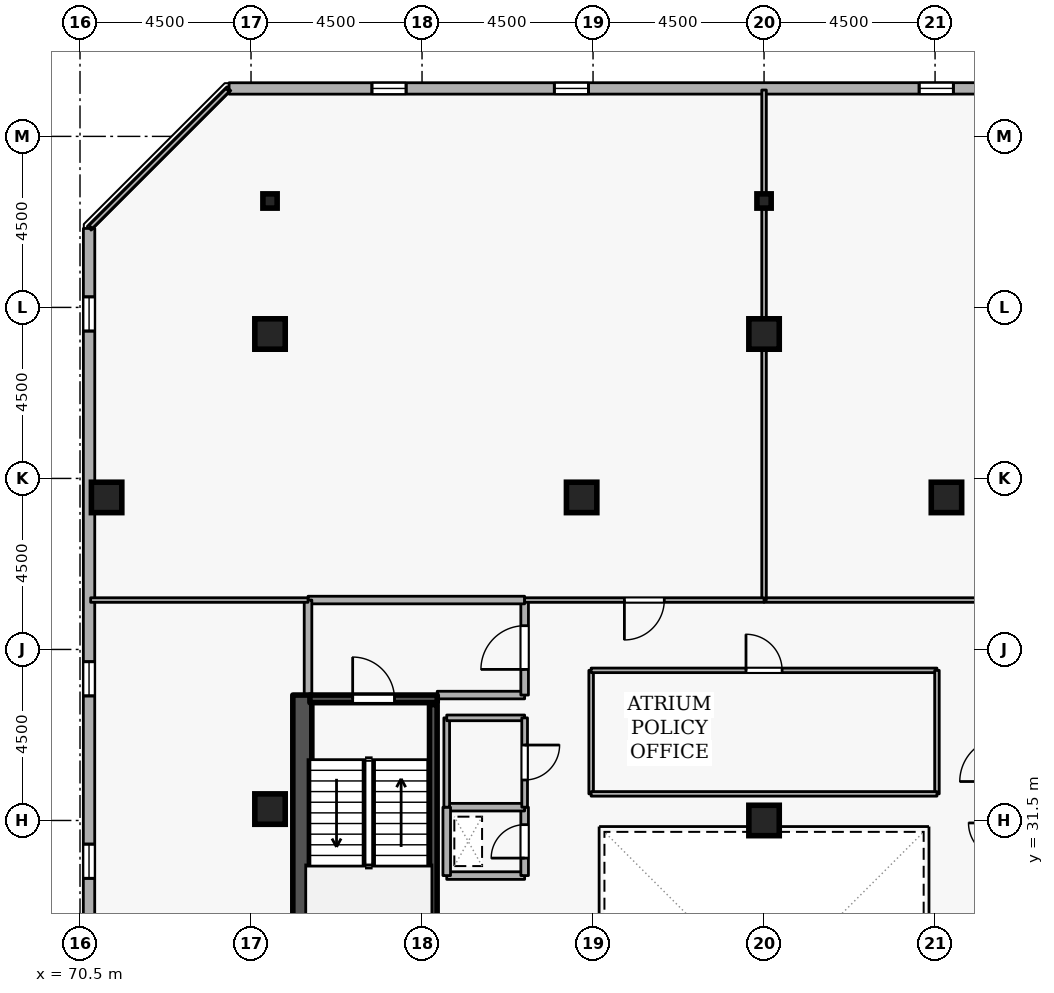
"""IFC4 building model, lengths in metres.
Left out: names, types, materials, properties, quantities, classifications, styles, units other than length and angle.
Written with IfcOpenShell. Run it as: python <this file> out.ifc"""

import sys

from ifc_helpers import new_model, si_unit, direction, frame, frame_2d, origin, origin_2d, place, context, subcontext, project, spatial, rectangle, i_section, extrude, element, fill, save


model = new_model("IFC4")
c1 = context("Model", 3, precision=1e-05, world=origin(), true_north=direction((0.0, 1.0)))
c2 = subcontext(c1, "Body", "Model", "MODEL_VIEW")
j1 = project(units=[si_unit("LENGTHUNIT", "METRE"), si_unit("PLANEANGLEUNIT", "RADIAN")], contexts=[c1])
p1 = place(None, origin())
s1 = spatial("IfcSite", under=j1, at=p1, CompositionType="ELEMENT")
p2 = place(p1, origin())
s2 = spatial("IfcBuilding", under=s1, at=p2, CompositionType="ELEMENT")
p3 = place(p2, frame((0.0, 0.0, 261.9)))
s3 = spatial("IfcBuildingStorey", under=s2, at=p3, CompositionType="ELEMENT", Elevation=261.9)
p4 = place(p3, frame((76.35, 19.2, 0.0), z_axis=(0.0, 0.0, 1.0), x_axis=(0.0, 1.0, 0.0)))
e1 = element("IfcWall", 1, at=p4, inside=s3, PredefinedType="SHEAR", context=c2, shape_type="SweptSolid", body=[
    extrude(rectangle(XDim=15.6, YDim=0.5, at=frame_2d((7.8, 0.0))), origin(), (0.0, 0.0, 1.0), 3.6),
])
for number, where, z_axis, x_axis in (
    (2, (88.5, 44.3, 0.0), (0.0, 0.0, 1.0), (1.0, 0.0, 0.0)),
    (3, (75.5, 44.3, 0.0), (0.0, 0.0, 1.0), (1.0, 0.0, 0.0)),
    (4, (71.2, 40.0, 0.0), (0.0, 0.0, 1.0), (1.0, 0.0, 0.0)),
    (5, (93.3, 40.0, 0.0), (0.0, 0.0, 1.0), (1.0, 0.0, 0.0)),
    (6, (83.7, 40.0, 0.0), (0.0, 0.0, 1.0), (1.0, 0.0, 0.0)),
    (7, (75.5, 31.8, 0.0), (0.0, 0.0, 1.0), (1.0, 0.0, 0.0)),
    (8, (88.5, 31.5, 0.0), (0.0, 0.0, 1.0), (1.0, 0.0, 0.0)),
):
    element("IfcColumn", number, at=place(p3, frame(where, z_axis=z_axis, x_axis=x_axis)), inside=s3, PredefinedType="COLUMN", context=c2, shape_type="SweptSolid", body=[
        extrude(rectangle(XDim=0.8, YDim=0.8, at=origin_2d()), origin(), (0.0, 0.0, 1.0), 3.6),
    ])
for number, where, z_axis, x_axis in (
    (9, (88.5, 47.8, 0.0), (0.0, 0.0, 1.0), (1.0, 0.0, 0.0)),
    (10, (75.5, 47.8, 0.0), (0.0, 0.0, 1.0), (1.0, 0.0, 0.0)),
):
    element("IfcColumn", number, at=place(p3, frame(where, z_axis=z_axis, x_axis=x_axis)), inside=s3, PredefinedType="COLUMN", context=c2, shape_type="SweptSolid", body=[
        extrude(i_section(OverallWidth=0.375, OverallDepth=0.375, WebThickness=0.017, FlangeThickness=0.027, FilletRadius=0.015, at=origin_2d()), origin(), (0.0, 0.0, 1.0), 3.6),
    ])
p5 = place(p3, frame((109.681, 50.765, 0.0), z_axis=(0.0, 0.0, 1.0), x_axis=(-0.999999994606, -0.000103863011, 0.0)))
e11 = element("IfcWall", 11, at=p5, inside=s3, PredefinedType="STANDARD", context=c2, shape_type="SweptSolid", body=[
    extrude(rectangle(XDim=35.259, YDim=0.3, at=frame_2d((17.629, 0.0))), origin(), (0.0, 0.0, 1.0), 2.7),
])
p6 = place(p5, frame((1.8, 0.0, 0.72)))
e12 = element("IfcOpeningElement", 12, at=p6, cuts=e11, PredefinedType="OPENING", context=c2, shape_type="SweptSolid", body=[
    extrude(rectangle(XDim=0.9, YDim=1.75, at=frame_2d((0.45, 0.875))), frame((0.0, 0.16, 0.0), z_axis=(0.0, -1.0, 0.0), x_axis=(1.0, 0.0, 0.0)), (0.0, 0.0, 1.0), 0.32),
])
p7 = place(p5, frame((6.6, 0.0, 0.72)))
e13 = element("IfcOpeningElement", 13, at=p7, cuts=e11, PredefinedType="OPENING", context=c2, shape_type="SweptSolid", body=[
    extrude(rectangle(XDim=0.9, YDim=1.75, at=frame_2d((0.45, 0.875))), frame((0.0, 0.16, 0.0), z_axis=(0.0, -1.0, 0.0), x_axis=(1.0, 0.0, 0.0)), (0.0, 0.0, 1.0), 0.32),
])
p8 = place(p5, frame((11.4, 0.0, 0.72)))
e14 = element("IfcOpeningElement", 14, at=p8, cuts=e11, PredefinedType="OPENING", context=c2, shape_type="SweptSolid", body=[
    extrude(rectangle(XDim=0.9, YDim=1.75, at=frame_2d((0.45, 0.875))), frame((0.0, 0.16, 0.0), z_axis=(0.0, -1.0, 0.0), x_axis=(1.0, 0.0, 0.0)), (0.0, 0.0, 1.0), 0.32),
])
p9 = place(p5, frame((16.2, 0.0, 0.72)))
e15 = element("IfcOpeningElement", 15, at=p9, cuts=e11, PredefinedType="OPENING", context=c2, shape_type="SweptSolid", body=[
    extrude(rectangle(XDim=0.9, YDim=1.75, at=frame_2d((0.45, 0.875))), frame((0.0, 0.16, 0.0), z_axis=(0.0, -1.0, 0.0), x_axis=(1.0, 0.0, 0.0)), (0.0, 0.0, 1.0), 0.32),
])
p10 = place(p5, frame((25.8, 0.0, 0.72)))
e16 = element("IfcOpeningElement", 16, at=p10, cuts=e11, PredefinedType="OPENING", context=c2, shape_type="SweptSolid", body=[
    extrude(rectangle(XDim=0.9, YDim=1.75, at=frame_2d((0.45, 0.875))), frame((0.0, 0.16, 0.0), z_axis=(0.0, -1.0, 0.0), x_axis=(1.0, 0.0, 0.0)), (0.0, 0.0, 1.0), 0.32),
])
p11 = place(p5, frame((30.6, 0.0, 0.72)))
e17 = element("IfcOpeningElement", 17, at=p11, cuts=e11, PredefinedType="OPENING", context=c2, shape_type="SweptSolid", body=[
    extrude(rectangle(XDim=0.9, YDim=1.75, at=frame_2d((0.45, 0.875))), frame((0.0, 0.16, 0.0), z_axis=(0.0, -1.0, 0.0), x_axis=(1.0, 0.0, 0.0)), (0.0, 0.0, 1.0), 0.32),
])
p12 = place(p3, frame((70.739, 47.078, 0.0), z_axis=(0.0, 0.0, 1.0), x_axis=(-0.000103863011, -0.999999994606, 0.0)))
e18 = element("IfcWall", 18, at=p12, inside=s3, PredefinedType="STANDARD", context=c2, shape_type="SweptSolid", body=[
    extrude(rectangle(XDim=35.259, YDim=0.3, at=frame_2d((17.629, 0.0))), origin(), (0.0, 0.0, 1.0), 2.7),
])
p13 = place(p12, frame((1.8, 0.0, 0.72)))
e19 = element("IfcOpeningElement", 19, at=p13, cuts=e18, PredefinedType="OPENING", context=c2, shape_type="SweptSolid", body=[
    extrude(rectangle(XDim=0.9, YDim=1.75, at=frame_2d((0.45, 0.875))), frame((0.0, 0.16, 0.0), z_axis=(0.0, -1.0, 0.0), x_axis=(1.0, 0.0, 0.0)), (0.0, 0.0, 1.0), 0.32),
])
p14 = place(p12, frame((11.4, 0.0, 0.72)))
e20 = element("IfcOpeningElement", 20, at=p14, cuts=e18, PredefinedType="OPENING", context=c2, shape_type="SweptSolid", body=[
    extrude(rectangle(XDim=0.9, YDim=1.75, at=frame_2d((0.45, 0.875))), frame((0.0, 0.16, 0.0), z_axis=(0.0, -1.0, 0.0), x_axis=(1.0, 0.0, 0.0)), (0.0, 0.0, 1.0), 0.32),
])
p15 = place(p12, frame((16.2, 0.0, 0.72)))
e21 = element("IfcOpeningElement", 21, at=p15, cuts=e18, PredefinedType="OPENING", context=c2, shape_type="SweptSolid", body=[
    extrude(rectangle(XDim=0.9, YDim=1.75, at=frame_2d((0.45, 0.875))), frame((0.0, 0.16, 0.0), z_axis=(0.0, -1.0, 0.0), x_axis=(1.0, 0.0, 0.0)), (0.0, 0.0, 1.0), 0.32),
])
p16 = place(p12, frame((25.8, 0.0, 0.72)))
e22 = element("IfcOpeningElement", 22, at=p16, cuts=e18, PredefinedType="OPENING", context=c2, shape_type="SweptSolid", body=[
    extrude(rectangle(XDim=0.9, YDim=1.75, at=frame_2d((0.45, 0.875))), frame((0.0, 0.16, 0.0), z_axis=(0.0, -1.0, 0.0), x_axis=(1.0, 0.0, 0.0)), (0.0, 0.0, 1.0), 0.32),
])
p17 = place(p12, frame((30.6, 0.0, 0.72)))
e23 = element("IfcOpeningElement", 23, at=p17, cuts=e18, PredefinedType="OPENING", context=c2, shape_type="SweptSolid", body=[
    extrude(rectangle(XDim=0.9, YDim=1.75, at=frame_2d((0.45, 0.875))), frame((0.0, 0.16, 0.0), z_axis=(0.0, -1.0, 0.0), x_axis=(1.0, 0.0, 0.0)), (0.0, 0.0, 1.0), 0.32),
])
p18 = place(p3, frame((76.55, 34.7, 0.0), z_axis=(0.0, 0.0, 1.0), x_axis=(1.0, 0.0, 0.0)))
e24 = element("IfcWall", 24, at=p18, inside=s3, PredefinedType="SHEAR", context=c2, shape_type="SweptSolid", body=[
    extrude(rectangle(XDim=3.35, YDim=0.2, at=frame_2d((1.675, 0.0))), origin(), (0.0, 0.0, 1.0), 3.6),
])
p19 = place(p18, frame((1.125, 0.0, 0.0)))
e25 = element("IfcOpeningElement", 25, at=p19, cuts=e24, PredefinedType="OPENING", context=c2, shape_type="SweptSolid", body=[
    extrude(rectangle(XDim=1.1, YDim=2.1, at=frame_2d((0.55, 1.05))), frame((0.0, 0.11, 0.0), z_axis=(0.0, -1.0, 0.0), x_axis=(1.0, 0.0, 0.0)), (0.0, 0.0, 1.0), 0.22),
])
p20 = place(p3, frame((79.797, 27.45, 0.0), z_axis=(0.0, 0.0, 1.0), x_axis=(0.0, 1.0, 0.0)))
e26 = element("IfcWall", 26, at=p20, inside=s3, PredefinedType="SHEAR", context=c2, shape_type="SweptSolid", body=[
    extrude(rectangle(XDim=7.1, YDim=0.2, at=frame_2d((3.55, 0.0))), origin(), (0.0, 0.0, 1.0), 3.6),
])
p21 = place(p3, frame((79.9, 34.8, 0.0), z_axis=(0.0, 0.0, 1.0), x_axis=(1.0, 0.0, 0.0)))
e27 = element("IfcWall", 27, at=p21, inside=s3, PredefinedType="STANDARD", context=c2, shape_type="SweptSolid", body=[
    extrude(rectangle(XDim=2.3, YDim=0.2, at=frame_2d((1.15, 0.0))), origin(), (0.0, 0.0, 1.0), 2.545),
])
p22 = place(p3, frame((82.2, 34.8, 0.0), z_axis=(0.0, 0.0, 1.0), x_axis=(0.0, 1.0, 0.0)))
e28 = element("IfcWall", 28, at=p22, inside=s3, PredefinedType="STANDARD", context=c2, shape_type="SweptSolid", body=[
    extrude(rectangle(XDim=2.5, YDim=0.2, at=frame_2d((1.25, 0.0))), origin(), (0.0, 0.0, 1.0), 3.34),
])
p23 = place(p22, frame((0.675, 0.0, 0.0)))
e29 = element("IfcOpeningElement", 29, at=p23, cuts=e28, PredefinedType="OPENING", context=c2, shape_type="SweptSolid", body=[
    extrude(rectangle(XDim=1.15, YDim=2.1, at=frame_2d((0.575, 1.05))), frame((0.0, 0.11, 0.0), z_axis=(0.0, -1.0, 0.0), x_axis=(1.0, 0.0, 0.0)), (0.0, 0.0, 1.0), 0.22),
])
p24 = place(p3, frame((82.2, 37.3, 0.0), z_axis=(0.0, 0.0, 1.0), x_axis=(-1.0, 0.0, 0.0)))
e30 = element("IfcWall", 30, at=p24, inside=s3, PredefinedType="STANDARD", context=c2, shape_type="SweptSolid", body=[
    extrude(rectangle(XDim=5.7, YDim=0.2, at=frame_2d((2.85, 0.0))), origin(), (0.0, 0.0, 1.0), 3.34),
])
p25 = place(p3, frame((76.5, 37.3, 0.0), z_axis=(0.0, 0.0, 1.0), x_axis=(0.0, -1.0, 0.0)))
e31 = element("IfcWall", 31, at=p25, inside=s3, PredefinedType="STANDARD", context=c2, shape_type="SweptSolid", body=[
    extrude(rectangle(XDim=2.5, YDim=0.2, at=frame_2d((1.25, 0.0))), origin(), (0.0, 0.0, 1.0), 3.34),
])
p26 = place(p3, frame((80.15, 30.05, 0.0), z_axis=(0.0, 0.0, 1.0), x_axis=(1.0, 0.0, 0.0)))
e32 = element("IfcWall", 32, at=p26, inside=s3, PredefinedType="STANDARD", context=c2, shape_type="SweptSolid", body=[
    extrude(rectangle(XDim=2.05, YDim=0.2, at=frame_2d((1.025, 0.0))), origin(), (0.0, 0.0, 1.0), 3.34),
])
p27 = place(p3, frame((82.2, 30.05, 0.0), z_axis=(0.0, 0.0, 1.0), x_axis=(0.0, 1.0, 0.0)))
e33 = element("IfcWall", 33, at=p27, inside=s3, PredefinedType="STANDARD", context=c2, shape_type="SweptSolid", body=[
    extrude(rectangle(XDim=1.8, YDim=0.2, at=frame_2d((0.9, 0.0))), origin(), (0.0, 0.0, 1.0), 3.34),
])
p28 = place(p27, frame((0.46, 0.0, 0.0)))
e34 = element("IfcOpeningElement", 34, at=p28, cuts=e33, PredefinedType="OPENING", context=c2, shape_type="SweptSolid", body=[
    extrude(rectangle(XDim=0.88, YDim=2.04, at=frame_2d((0.44, 1.02))), frame((0.0, 0.11, 0.0), z_axis=(0.0, -1.0, 0.0), x_axis=(1.0, 0.0, 0.0)), (0.0, 0.0, 1.0), 0.22),
])
p29 = place(p3, frame((82.2, 31.85, 0.0), z_axis=(0.0, 0.0, 1.0), x_axis=(-1.0, 0.0, 0.0)))
e35 = element("IfcWall", 35, at=p29, inside=s3, PredefinedType="STANDARD", context=c2, shape_type="SweptSolid", body=[
    extrude(rectangle(XDim=2.05, YDim=0.2, at=frame_2d((1.025, 0.0))), origin(), (0.0, 0.0, 1.0), 3.34),
])
p30 = place(p3, frame((80.15, 31.85, 0.0), z_axis=(0.0, 0.0, 1.0), x_axis=(0.0, -1.0, 0.0)))
e36 = element("IfcWall", 36, at=p30, inside=s3, PredefinedType="STANDARD", context=c2, shape_type="SweptSolid", body=[
    extrude(rectangle(XDim=1.8, YDim=0.2, at=frame_2d((0.9, 0.0))), origin(), (0.0, 0.0, 1.0), 3.34),
])
p31 = place(p3, frame((80.15, 31.85, 0.0), z_axis=(0.0, 0.0, 1.0), x_axis=(0.0, 1.0, 0.0)))
e37 = element("IfcWall", 37, at=p31, inside=s3, PredefinedType="PARTITIONING", context=c2, shape_type="SweptSolid", body=[
    extrude(rectangle(XDim=2.35, YDim=0.15, at=frame_2d((1.175, 0.0))), origin(), (0.0, 0.0, 1.0), 3.34),
])
p32 = place(p3, frame((80.15, 34.2, 0.0), z_axis=(0.0, 0.0, 1.0), x_axis=(1.0, 0.0, 0.0)))
e38 = element("IfcWall", 38, at=p32, inside=s3, PredefinedType="PARTITIONING", context=c2, shape_type="SweptSolid", body=[
    extrude(rectangle(XDim=2.05, YDim=0.15, at=frame_2d((1.025, 0.0))), origin(), (0.0, 0.0, 1.0), 2.545),
])
p33 = place(p3, frame((82.2, 34.2, 0.0), z_axis=(0.0, 0.0, 1.0), x_axis=(0.0, -1.0, 0.0)))
e39 = element("IfcWall", 39, at=p33, inside=s3, PredefinedType="PARTITIONING", context=c2, shape_type="SweptSolid", body=[
    extrude(rectangle(XDim=2.35, YDim=0.15, at=frame_2d((1.175, 0.0))), origin(), (0.0, 0.0, 1.0), 3.34),
])
p34 = place(p33, frame((0.715, 0.0, 0.0)))
e40 = element("IfcOpeningElement", 40, at=p34, cuts=e39, PredefinedType="OPENING", context=c2, shape_type="SweptSolid", body=[
    extrude(rectangle(XDim=0.92, YDim=2.08, at=frame_2d((0.46, 1.04))), frame((0.0, 0.085, 0.0), z_axis=(0.0, -1.0, 0.0), x_axis=(1.0, 0.0, 0.0)), (0.0, 0.0, 1.0), 0.17),
])
p35 = place(p3, frame((100.7, 37.3, 0.0), z_axis=(0.0, 0.0, 1.0), x_axis=(-1.0, 0.0, 0.0)))
e41 = element("IfcWall", 41, at=p35, inside=s3, PredefinedType="PARTITIONING", context=c2, shape_type="SweptSolid", body=[
    extrude(rectangle(XDim=12.2, YDim=0.12, at=frame_2d((6.1, 0.0))), origin(), (0.0, 0.0, 1.0), 3.34),
])
p36 = place(p35, frame((5.575, 0.0, 0.0)))
e42 = element("IfcOpeningElement", 42, at=p36, cuts=e41, PredefinedType="OPENING", context=c2, shape_type="SweptSolid", body=[
    extrude(rectangle(XDim=1.05, YDim=2.1, at=frame_2d((0.525, 1.05))), frame((0.0, 0.07, 0.0), z_axis=(0.0, -1.0, 0.0), x_axis=(1.0, 0.0, 0.0)), (0.0, 0.0, 1.0), 0.14),
])
p37 = place(p3, frame((88.5, 37.3, 0.0), z_axis=(0.0, 0.0, 1.0), x_axis=(0.0, 1.0, 0.0)))
e43 = element("IfcWall", 43, at=p37, inside=s3, PredefinedType="PARTITIONING", context=c2, shape_type="SweptSolid", body=[
    extrude(rectangle(XDim=13.42, YDim=0.12, at=frame_2d((6.71, 0.0))), origin(), (0.0, 0.0, 1.0), 2.932),
])
p38 = place(p3, frame((76.5, 37.3, 0.0), z_axis=(0.0, 0.0, 1.0), x_axis=(-1.0, 0.0, 0.0)))
e44 = element("IfcWall", 44, at=p38, inside=s3, PredefinedType="PARTITIONING", context=c2, shape_type="SweptSolid", body=[
    extrude(rectangle(XDim=5.72, YDim=0.12, at=frame_2d((2.86, 0.0))), origin(), (0.0, 0.0, 1.0), 3.34),
])
p39 = place(p3, frame((70.78, 47.117, 0.0), z_axis=(0.0, 0.0, 1.0), x_axis=(0.707106781187, 0.707106781187, 0.0)))
e45 = element("IfcWall", 45, at=p39, inside=s3, PredefinedType="PARTITIONING", context=c2, shape_type="SweptSolid", body=[
    extrude(rectangle(XDim=5.095, YDim=0.12, at=frame_2d((2.547, 0.0))), origin(), (0.0, 0.0, 1.0), 3.34),
])
p40 = place(p3, frame((88.5, 37.3, 0.0), z_axis=(0.0, 0.0, 1.0), x_axis=(-1.0, 0.0, 0.0)))
e46 = element("IfcWall", 46, at=p40, inside=s3, PredefinedType="PARTITIONING", context=c2, shape_type="SweptSolid", body=[
    extrude(rectangle(XDim=6.3, YDim=0.12, at=frame_2d((3.15, 0.0))), origin(), (0.0, 0.0, 1.0), 3.34),
])
p41 = place(p40, frame((2.625, 0.0, 0.0)))
e47 = element("IfcOpeningElement", 47, at=p41, cuts=e46, PredefinedType="OPENING", context=c2, shape_type="SweptSolid", body=[
    extrude(rectangle(XDim=1.05, YDim=2.1, at=frame_2d((0.525, 1.05))), frame((0.0, 0.07, 0.0), z_axis=(0.0, -1.0, 0.0), x_axis=(1.0, 0.0, 0.0)), (0.0, 0.0, 1.0), 0.14),
])
p42 = place(p3, frame((83.95, 32.2, 0.0), z_axis=(0.0, 0.0, 1.0), x_axis=(0.0, 1.0, 0.0)))
e48 = element("IfcWall", 48, at=p42, inside=s3, PredefinedType="PARTITIONING", context=c2, shape_type="SweptSolid", body=[
    extrude(rectangle(XDim=3.25, YDim=0.12, at=frame_2d((1.625, 0.0))), origin(), (0.0, 0.0, 1.0), 3.34),
])
p43 = place(p3, frame((83.95, 35.45, 0.0), z_axis=(0.0, 0.0, 1.0), x_axis=(1.0, 0.0, 0.0)))
e49 = element("IfcWall", 49, at=p43, inside=s3, PredefinedType="PARTITIONING", context=c2, shape_type="SweptSolid", body=[
    extrude(rectangle(XDim=9.1, YDim=0.12, at=frame_2d((4.55, 0.0))), origin(), (0.0, 0.0, 1.0), 3.34),
])
p44 = place(p43, frame((4.075, 0.0, 0.0)))
e50 = element("IfcOpeningElement", 50, at=p44, cuts=e49, PredefinedType="OPENING", context=c2, shape_type="SweptSolid", body=[
    extrude(rectangle(XDim=0.95, YDim=2.1, at=frame_2d((0.475, 1.05))), frame((0.0, 0.07, 0.0), z_axis=(0.0, -1.0, 0.0), x_axis=(1.0, 0.0, 0.0)), (0.0, 0.0, 1.0), 0.14),
])
p45 = place(p3, frame((93.05, 35.45, 0.0), z_axis=(0.0, 0.0, 1.0), x_axis=(0.0, -1.0, 0.0)))
e51 = element("IfcWall", 51, at=p45, inside=s3, PredefinedType="PARTITIONING", context=c2, shape_type="SweptSolid", body=[
    extrude(rectangle(XDim=3.25, YDim=0.12, at=frame_2d((1.625, 0.0))), origin(), (0.0, 0.0, 1.0), 3.34),
])
p46 = place(p3, frame((93.05, 32.2, 0.0), z_axis=(0.0, 0.0, 1.0), x_axis=(-1.0, 0.0, 0.0)))
e52 = element("IfcWall", 52, at=p46, inside=s3, PredefinedType="PARTITIONING", context=c2, shape_type="SweptSolid", body=[
    extrude(rectangle(XDim=9.1, YDim=0.12, at=frame_2d((4.55, 0.0))), origin(), (0.0, 0.0, 1.0), 3.34),
])
p47 = place(p9, origin())
e53 = element("IfcWindow", 53, at=p47, inside=s3, PartitioningType="SINGLE_PANEL", PredefinedType="WINDOW", context=c2, shape_type="SweptSolid", body=[
    extrude(rectangle(XDim=0.9, YDim=1.75, at=frame_2d((0.45, 0.875))), frame((0.0, 0.03, 0.0), z_axis=(0.0, -1.0, 0.0), x_axis=(1.0, 0.0, 0.0)), (0.0, 0.0, 1.0), 0.06),
])
fill(e15, e53)
p48 = place(p10, origin())
e54 = element("IfcWindow", 54, at=p48, inside=s3, PartitioningType="SINGLE_PANEL", PredefinedType="WINDOW", context=c2, shape_type="SweptSolid", body=[
    extrude(rectangle(XDim=0.9, YDim=1.75, at=frame_2d((0.45, 0.875))), frame((0.0, 0.03, 0.0), z_axis=(0.0, -1.0, 0.0), x_axis=(1.0, 0.0, 0.0)), (0.0, 0.0, 1.0), 0.06),
])
fill(e16, e54)
p49 = place(p11, origin())
e55 = element("IfcWindow", 55, at=p49, inside=s3, PartitioningType="SINGLE_PANEL", PredefinedType="WINDOW", context=c2, shape_type="SweptSolid", body=[
    extrude(rectangle(XDim=0.9, YDim=1.75, at=frame_2d((0.45, 0.875))), frame((0.0, 0.03, 0.0), z_axis=(0.0, -1.0, 0.0), x_axis=(1.0, 0.0, 0.0)), (0.0, 0.0, 1.0), 0.06),
])
fill(e17, e55)
p50 = place(p13, origin())
e56 = element("IfcWindow", 56, at=p50, inside=s3, PartitioningType="SINGLE_PANEL", PredefinedType="WINDOW", context=c2, shape_type="SweptSolid", body=[
    extrude(rectangle(XDim=0.9, YDim=1.75, at=frame_2d((0.45, 0.875))), frame((0.0, 0.03, 0.0), z_axis=(0.0, -1.0, 0.0), x_axis=(1.0, 0.0, 0.0)), (0.0, 0.0, 1.0), 0.06),
])
fill(e19, e56)
p51 = place(p14, origin())
e57 = element("IfcWindow", 57, at=p51, inside=s3, PartitioningType="SINGLE_PANEL", PredefinedType="WINDOW", context=c2, shape_type="SweptSolid", body=[
    extrude(rectangle(XDim=0.9, YDim=1.75, at=frame_2d((0.45, 0.875))), frame((0.0, 0.03, 0.0), z_axis=(0.0, -1.0, 0.0), x_axis=(1.0, 0.0, 0.0)), (0.0, 0.0, 1.0), 0.06),
])
fill(e20, e57)
p52 = place(p15, origin())
e58 = element("IfcWindow", 58, at=p52, inside=s3, PartitioningType="SINGLE_PANEL", PredefinedType="WINDOW", context=c2, shape_type="SweptSolid", body=[
    extrude(rectangle(XDim=0.9, YDim=1.75, at=frame_2d((0.45, 0.875))), frame((0.0, 0.03, 0.0), z_axis=(0.0, -1.0, 0.0), x_axis=(1.0, 0.0, 0.0)), (0.0, 0.0, 1.0), 0.06),
])
fill(e21, e58)
p53 = place(p19, origin())
e59 = element("IfcDoor", 59, at=p53, inside=s3, OperationType="SINGLE_SWING_LEFT", PredefinedType="DOOR", context=c2, shape_type="SweptSolid", body=[
    extrude(rectangle(XDim=1.1, YDim=2.1, at=frame_2d((0.55, 1.05))), frame((0.0, 0.025, 0.0), z_axis=(0.0, -1.0, 0.0), x_axis=(1.0, 0.0, 0.0)), (0.0, 0.0, 1.0), 0.05),
])
fill(e25, e59)
p54 = place(p23, origin())
e60 = element("IfcDoor", 60, at=p54, inside=s3, OperationType="SINGLE_SWING_LEFT", PredefinedType="DOOR", context=c2, shape_type="SweptSolid", body=[
    extrude(rectangle(XDim=1.15, YDim=2.1, at=frame_2d((0.575, 1.05))), frame((0.0, 0.025, 0.0), z_axis=(0.0, -1.0, 0.0), x_axis=(1.0, 0.0, 0.0)), (0.0, 0.0, 1.0), 0.05),
])
fill(e29, e60)
p55 = place(p28, origin())
e61 = element("IfcDoor", 61, at=p55, inside=s3, OperationType="SINGLE_SWING_LEFT", PredefinedType="DOOR", context=c2, shape_type="SweptSolid", body=[
    extrude(rectangle(XDim=0.88, YDim=2.04, at=frame_2d((0.44, 1.02))), frame((0.0, 0.025, 0.0), z_axis=(0.0, -1.0, 0.0), x_axis=(1.0, 0.0, 0.0)), (0.0, 0.0, 1.0), 0.05),
])
fill(e34, e61)
p56 = place(p34, origin())
e62 = element("IfcDoor", 62, at=p56, inside=s3, OperationType="SINGLE_SWING_LEFT", PredefinedType="DOOR", context=c2, shape_type="SweptSolid", body=[
    extrude(rectangle(XDim=0.92, YDim=2.08, at=frame_2d((0.46, 1.04))), frame((0.0, 0.025, 0.0), z_axis=(0.0, -1.0, 0.0), x_axis=(1.0, 0.0, 0.0)), (0.0, 0.0, 1.0), 0.05),
])
fill(e40, e62)
p57 = place(p41, origin())
e63 = element("IfcDoor", 63, at=p57, inside=s3, OperationType="SINGLE_SWING_RIGHT", PredefinedType="DOOR", context=c2, shape_type="SweptSolid", body=[
    extrude(rectangle(XDim=1.05, YDim=2.1, at=frame_2d((0.525, 1.05))), frame((0.0, 0.025, 0.0), z_axis=(0.0, -1.0, 0.0), x_axis=(1.0, 0.0, 0.0)), (0.0, 0.0, 1.0), 0.05),
])
fill(e47, e63)
p58 = place(p44, origin())
e64 = element("IfcDoor", 64, at=p58, inside=s3, OperationType="SINGLE_SWING_LEFT", PredefinedType="DOOR", context=c2, shape_type="SweptSolid", body=[
    extrude(rectangle(XDim=0.95, YDim=2.1, at=frame_2d((0.475, 1.05))), frame((0.0, 0.025, 0.0), z_axis=(0.0, -1.0, 0.0), x_axis=(1.0, 0.0, 0.0)), (0.0, 0.0, 1.0), 0.05),
])
fill(e50, e64)
save(model, sys.argv[1])
